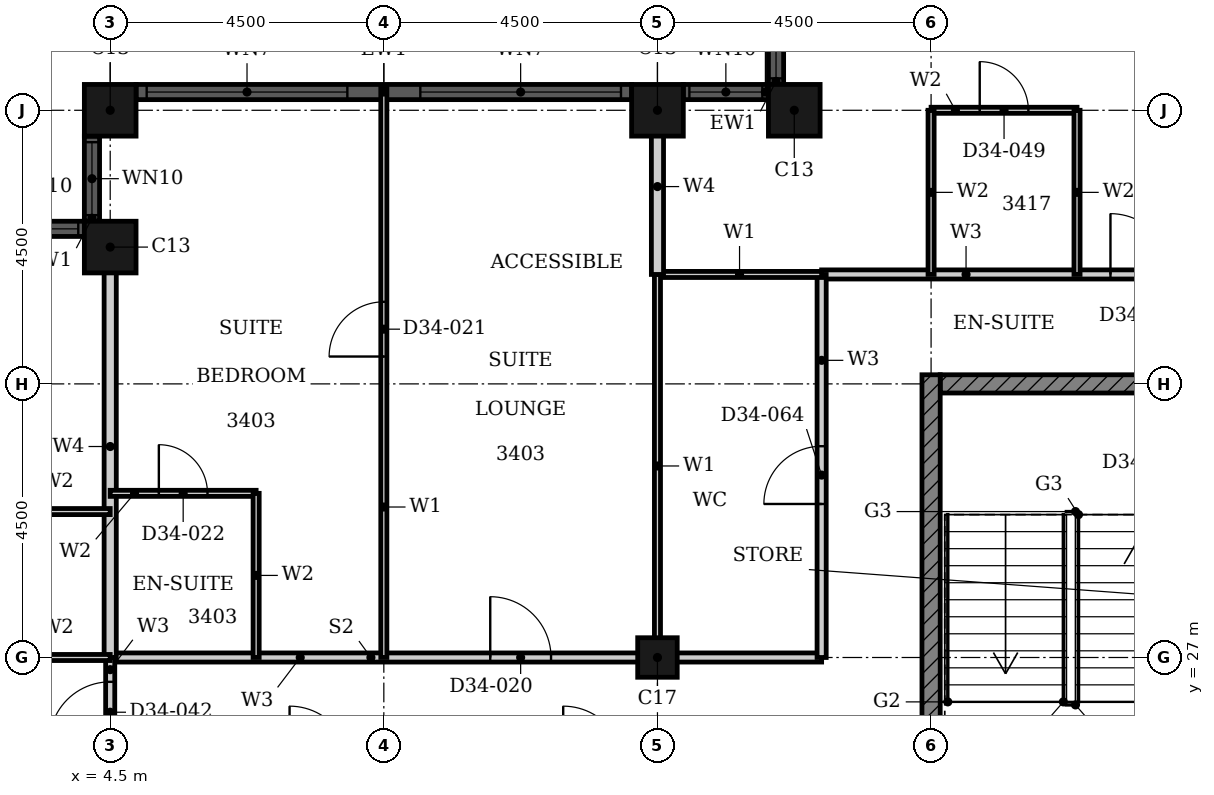
"""IFC4 building model, lengths in metres.
Left out: names, types, materials, properties, quantities, classifications, styles, units other than length and angle.
Written with IfcOpenShell. Run it as: python <this file> out.ifc"""

import sys

from ifc_helpers import new_model, si_unit, direction, frame, frame_2d, origin, origin_2d, place, context, subcontext, project, spatial, rectangle, hollow_rectangle, extrude, element, fill, save


model = new_model("IFC4")
c1 = context("Model", 3, precision=1e-05, world=origin(), true_north=direction((0.0, 1.0)))
c2 = subcontext(c1, "Body", "Model", "MODEL_VIEW")
j1 = project(units=[si_unit("LENGTHUNIT", "METRE"), si_unit("PLANEANGLEUNIT", "RADIAN")], contexts=[c1])
p1 = place(None, origin())
s1 = spatial("IfcSite", under=j1, at=p1, CompositionType="ELEMENT")
p2 = place(p1, origin())
s2 = spatial("IfcBuilding", under=s1, at=p2, CompositionType="ELEMENT")
p3 = place(p2, frame((0.0, 0.0, 136.8)))
s3 = spatial("IfcBuildingStorey", under=s2, at=p3, CompositionType="ELEMENT", Elevation=136.8)
for number, where, z_axis, x_axis in (
    (1, (15.75, 36.0, 0.0), (0.0, 0.0, 1.0), (1.0, 0.0, 0.0)),
    (2, (13.5, 36.0, 0.0), (0.0, 0.0, 1.0), (1.0, 0.0, 0.0)),
    (3, (4.5, 36.0, 0.0), (0.0, 0.0, 1.0), (1.0, 0.0, 0.0)),
    (4, (4.5, 33.75, 0.0), (0.0, 0.0, 1.0), (1.0, 0.0, 0.0)),
):
    element("IfcColumn", number, at=place(p3, frame(where, z_axis=z_axis, x_axis=x_axis)), inside=s3, PredefinedType="COLUMN", context=c2, shape_type="SweptSolid", body=[
        extrude(hollow_rectangle(XDim=0.85, YDim=0.85, WallThickness=0.026, at=origin_2d()), origin(), (0.0, 0.0, 1.0), 3.6),
    ])
p4 = place(p3, frame((13.5, 27.0, 0.0), z_axis=(0.0, 0.0, 1.0), x_axis=(1.0, 0.0, 0.0)))
e5 = element("IfcColumn", 5, at=p4, inside=s3, PredefinedType="COLUMN", context=c2, shape_type="SweptSolid", body=[
    extrude(hollow_rectangle(XDim=0.65, YDim=0.65, WallThickness=0.021, at=origin_2d()), origin(), (0.0, 0.0, 1.0), 3.6),
])
p5 = place(p3, frame((15.45, 37.825, 0.0), z_axis=(0.0, 0.0, 1.0), x_axis=(0.0, -1.0, 0.0)))
e6 = element("IfcWall", 6, at=p5, inside=s3, PredefinedType="SOLIDWALL", context=c2, shape_type="SweptSolid", body=[
    extrude(rectangle(XDim=1.4, YDim=0.25, at=frame_2d((0.7, 0.0))), origin(), (0.0, 0.0, 1.0), 3.6),
])
p6 = place(p5, frame((0.1, 0.0, 0.9)))
e7 = element("IfcOpeningElement", 7, at=p6, cuts=e6, PredefinedType="OPENING", context=c2, shape_type="SweptSolid", body=[
    extrude(rectangle(XDim=1.2, YDim=1.85, at=frame_2d((0.6, 0.925))), frame((0.0, 0.135, 0.0), z_axis=(0.0, -1.0, 0.0), x_axis=(1.0, 0.0, 0.0)), (0.0, 0.0, 1.0), 0.27),
])
p7 = place(p3, frame((15.325, 36.3, 0.0), z_axis=(0.0, 0.0, 1.0), x_axis=(-1.0, 0.0, 0.0)))
e8 = element("IfcWall", 8, at=p7, inside=s3, PredefinedType="SOLIDWALL", context=c2, shape_type="SweptSolid", body=[
    extrude(rectangle(XDim=1.4, YDim=0.25, at=frame_2d((0.7, 0.0))), origin(), (0.0, 0.0, 1.0), 3.6),
])
p8 = place(p7, frame((0.1, 0.0, 0.9)))
e9 = element("IfcOpeningElement", 9, at=p8, cuts=e8, PredefinedType="OPENING", context=c2, shape_type="SweptSolid", body=[
    extrude(rectangle(XDim=1.2, YDim=1.85, at=frame_2d((0.6, 0.925))), frame((0.0, 0.135, 0.0), z_axis=(0.0, -1.0, 0.0), x_axis=(1.0, 0.0, 0.0)), (0.0, 0.0, 1.0), 0.27),
])
p9 = place(p3, frame((13.075, 36.3, 0.0), z_axis=(0.0, 0.0, 1.0), x_axis=(-1.0, 0.0, 0.0)))
e10 = element("IfcWall", 10, at=p9, inside=s3, PredefinedType="SOLIDWALL", context=c2, shape_type="SweptSolid", body=[
    extrude(rectangle(XDim=8.15, YDim=0.25, at=frame_2d((4.075, 0.0))), origin(), (0.0, 0.0, 1.0), 3.6),
])
p10 = place(p9, frame((0.175, 0.0, 0.9)))
e11 = element("IfcOpeningElement", 11, at=p10, cuts=e10, PredefinedType="OPENING", context=c2, shape_type="SweptSolid", body=[
    extrude(rectangle(XDim=3.3, YDim=1.85, at=frame_2d((1.65, 0.925))), frame((0.0, 0.135, 0.0), z_axis=(0.0, -1.0, 0.0), x_axis=(1.0, 0.0, 0.0)), (0.0, 0.0, 1.0), 0.27),
])
p11 = place(p9, frame((4.675, 0.0, 0.9)))
e12 = element("IfcOpeningElement", 12, at=p11, cuts=e10, PredefinedType="OPENING", context=c2, shape_type="SweptSolid", body=[
    extrude(rectangle(XDim=3.3, YDim=1.85, at=frame_2d((1.65, 0.925))), frame((0.0, 0.135, 0.0), z_axis=(0.0, -1.0, 0.0), x_axis=(1.0, 0.0, 0.0)), (0.0, 0.0, 1.0), 0.27),
])
p12 = place(p3, frame((4.2, 35.575, 0.0), z_axis=(0.0, 0.0, 1.0), x_axis=(0.0, -1.0, 0.0)))
e13 = element("IfcWall", 13, at=p12, inside=s3, PredefinedType="SOLIDWALL", context=c2, shape_type="SweptSolid", body=[
    extrude(rectangle(XDim=1.4, YDim=0.25, at=frame_2d((0.7, 0.0))), origin(), (0.0, 0.0, 1.0), 3.6),
])
p13 = place(p12, frame((0.1, 0.0, 0.9)))
e14 = element("IfcOpeningElement", 14, at=p13, cuts=e13, PredefinedType="OPENING", context=c2, shape_type="SweptSolid", body=[
    extrude(rectangle(XDim=1.2, YDim=1.85, at=frame_2d((0.6, 0.925))), frame((0.0, 0.135, 0.0), z_axis=(0.0, -1.0, 0.0), x_axis=(1.0, 0.0, 0.0)), (0.0, 0.0, 1.0), 0.27),
])
p14 = place(p3, frame((4.075, 34.05, 0.0), z_axis=(0.0, 0.0, 1.0), x_axis=(-1.0, 0.0, 0.0)))
e15 = element("IfcWall", 15, at=p14, inside=s3, PredefinedType="SOLIDWALL", context=c2, shape_type="SweptSolid", body=[
    extrude(rectangle(XDim=1.4, YDim=0.25, at=frame_2d((0.7, 0.0))), origin(), (0.0, 0.0, 1.0), 3.6),
])
p15 = place(p14, frame((0.1, 0.0, 0.9)))
e16 = element("IfcOpeningElement", 16, at=p15, cuts=e15, PredefinedType="OPENING", context=c2, shape_type="SweptSolid", body=[
    extrude(rectangle(XDim=1.2, YDim=1.85, at=frame_2d((0.6, 0.925))), frame((0.0, 0.135, 0.0), z_axis=(0.0, -1.0, 0.0), x_axis=(1.0, 0.0, 0.0)), (0.0, 0.0, 1.0), 0.27),
])
p16 = place(p3, frame((18.15, 31.5, 0.0), z_axis=(0.0, 0.0, 1.0), x_axis=(1.0, 0.0, 0.0)))
e17 = element("IfcWall", 17, at=p16, inside=s3, PredefinedType="SHEAR", context=c2, shape_type="SweptSolid", body=[
    extrude(rectangle(XDim=6.797, YDim=0.3, at=frame_2d((3.398, 0.0))), origin(), (0.0, 0.0, 1.0), 3.2),
])
p17 = place(p16, frame((4.736, 0.0, 0.0)))
e18 = element("IfcOpeningElement", 18, at=p17, cuts=e17, PredefinedType="OPENING", context=c2, shape_type="SweptSolid", body=[
    extrude(rectangle(XDim=1.8, YDim=2.1, at=frame_2d((0.9, 1.05))), frame((0.0, 0.16, 0.0), z_axis=(0.0, -1.0, 0.0), x_axis=(1.0, 0.0, 0.0)), (0.0, 0.0, 1.0), 0.32),
])
p18 = place(p3, frame((18.0, 22.35, 0.0), z_axis=(0.0, 0.0, 1.0), x_axis=(0.0, 1.0, 0.0)))
e19 = element("IfcWall", 19, at=p18, inside=s3, PredefinedType="SHEAR", context=c2, shape_type="SweptSolid", body=[
    extrude(rectangle(XDim=9.3, YDim=0.3, at=frame_2d((4.65, 0.0))), origin(), (0.0, 0.0, 1.0), 3.2),
])
p19 = place(p3, frame((4.5, 27.0, 0.0), z_axis=(0.0, 0.0, 1.0), x_axis=(1.0, 0.0, 0.0)))
e20 = element("IfcWall", 20, at=p19, inside=s3, PredefinedType="PARTITIONING", context=c2, shape_type="SweptSolid", body=[
    extrude(rectangle(XDim=11.7, YDim=0.15, at=frame_2d((5.85, 0.0))), origin(), (0.0, 0.0, 1.0), 2.48),
])
p20 = place(p19, frame((6.25, 0.0, 0.0)))
e21 = element("IfcOpeningElement", 21, at=p20, cuts=e20, PredefinedType="OPENING", context=c2, shape_type="SweptSolid", body=[
    extrude(rectangle(XDim=1.0, YDim=2.1, at=frame_2d((0.5, 1.05))), frame((0.0, 0.085, 0.0), z_axis=(0.0, -1.0, 0.0), x_axis=(1.0, 0.0, 0.0)), (0.0, 0.0, 1.0), 0.17),
])
p21 = place(p3, frame((16.2, 33.3, 0.0), z_axis=(0.0, 0.0, 1.0), x_axis=(1.0, 0.0, 0.0)))
e22 = element("IfcWall", 22, at=p21, inside=s3, PredefinedType="PARTITIONING", context=c2, shape_type="SweptSolid", body=[
    extrude(rectangle(XDim=15.3, YDim=0.15, at=frame_2d((7.65, 0.0))), origin(), (0.0, 0.0, 1.0), 3.2),
])
p22 = place(p21, frame((4.75, 0.0, 0.0)))
e23 = element("IfcOpeningElement", 23, at=p22, cuts=e22, PredefinedType="OPENING", context=c2, shape_type="SweptSolid", body=[
    extrude(rectangle(XDim=1.0, YDim=2.1, at=frame_2d((0.5, 1.05))), frame((0.0, 0.085, 0.0), z_axis=(0.0, -1.0, 0.0), x_axis=(1.0, 0.0, 0.0)), (0.0, 0.0, 1.0), 0.17),
])
p23 = place(p21, frame((10.35, 0.0, 0.0)))
e24 = element("IfcOpeningElement", 24, at=p23, cuts=e22, PredefinedType="OPENING", context=c2, shape_type="SweptSolid", body=[
    extrude(rectangle(XDim=0.9, YDim=2.1, at=frame_2d((0.45, 1.05))), frame((0.0, 0.085, 0.0), z_axis=(0.0, -1.0, 0.0), x_axis=(1.0, 0.0, 0.0)), (0.0, 0.0, 1.0), 0.17),
])
p24 = place(p3, frame((16.2, 27.0, 0.0), z_axis=(0.0, 0.0, 1.0), x_axis=(0.0, 1.0, 0.0)))
e25 = element("IfcWall", 25, at=p24, inside=s3, PredefinedType="PARTITIONING", context=c2, shape_type="SweptSolid", body=[
    extrude(rectangle(XDim=6.3, YDim=0.15, at=frame_2d((3.15, 0.0))), origin(), (0.0, 0.0, 1.0), 3.2),
])
p25 = place(p24, frame((2.525, 0.0, 0.0)))
e26 = element("IfcOpeningElement", 26, at=p25, cuts=e25, PredefinedType="OPENING", context=c2, shape_type="SweptSolid", body=[
    extrude(rectangle(XDim=0.95, YDim=2.1, at=frame_2d((0.475, 1.05))), frame((0.0, 0.085, 0.0), z_axis=(0.0, -1.0, 0.0), x_axis=(1.0, 0.0, 0.0)), (0.0, 0.0, 1.0), 0.17),
])
p26 = place(p3, frame((4.5, 25.2, 0.0), z_axis=(0.0, 0.0, 1.0), x_axis=(0.0, 1.0, 0.0)))
e27 = element("IfcWall", 27, at=p26, inside=s3, PredefinedType="PARTITIONING", context=c2, shape_type="SweptSolid", body=[
    extrude(rectangle(XDim=1.8, YDim=0.15, at=frame_2d((0.9, 0.0))), origin(), (0.0, 0.0, 1.0), 3.2),
])
p27 = place(p26, frame((0.4, 0.0, 0.0)))
e28 = element("IfcOpeningElement", 28, at=p27, cuts=e27, PredefinedType="OPENING", context=c2, shape_type="SweptSolid", body=[
    extrude(rectangle(XDim=1.0, YDim=2.1, at=frame_2d((0.5, 1.05))), frame((0.0, 0.085, 0.0), z_axis=(0.0, -1.0, 0.0), x_axis=(1.0, 0.0, 0.0)), (0.0, 0.0, 1.0), 0.17),
])
p28 = place(p3, frame((13.5, 33.3, 0.0), z_axis=(0.0, 0.0, 1.0), x_axis=(1.0, 0.0, 0.0)))
e29 = element("IfcWall", 29, at=p28, inside=s3, PredefinedType="PARTITIONING", context=c2, shape_type="SweptSolid", body=[
    extrude(rectangle(XDim=2.7, YDim=0.1, at=frame_2d((1.35, 0.0))), origin(), (0.0, 0.0, 1.0), 3.2),
])
p29 = place(p3, frame((13.5, 27.0, 0.0), z_axis=(0.0, 0.0, 1.0), x_axis=(0.0, 1.0, 0.0)))
e30 = element("IfcWall", 30, at=p29, inside=s3, PredefinedType="PARTITIONING", context=c2, shape_type="SweptSolid", body=[
    extrude(rectangle(XDim=6.3, YDim=0.1, at=frame_2d((3.15, 0.0))), origin(), (0.0, 0.0, 1.0), 2.28),
])
p30 = place(p3, frame((9.0, 27.0, 0.0), z_axis=(0.0, 0.0, 1.0), x_axis=(0.0, 1.0, 0.0)))
e31 = element("IfcWall", 31, at=p30, inside=s3, PredefinedType="PARTITIONING", context=c2, shape_type="SweptSolid", body=[
    extrude(rectangle(XDim=9.365, YDim=0.1, at=frame_2d((4.683, 0.0))), origin(), (0.0, 0.0, 1.0), 3.2),
])
p31 = place(p30, frame((4.95, 0.0, 0.0)))
e32 = element("IfcOpeningElement", 32, at=p31, cuts=e31, PredefinedType="OPENING", context=c2, shape_type="SweptSolid", body=[
    extrude(rectangle(XDim=0.9, YDim=2.1, at=frame_2d((0.45, 1.05))), frame((0.0, 0.06, 0.0), z_axis=(0.0, -1.0, 0.0), x_axis=(1.0, 0.0, 0.0)), (0.0, 0.0, 1.0), 0.12),
])
p32 = place(p3, frame((13.5, 33.3, 0.0), z_axis=(0.0, 0.0, 1.0), x_axis=(0.0, 1.0, 0.0)))
e33 = element("IfcWall", 33, at=p32, inside=s3, PredefinedType="PARTITIONING", context=c2, shape_type="SweptSolid", body=[
    extrude(rectangle(XDim=2.89, YDim=0.2, at=frame_2d((1.445, 0.0))), origin(), (0.0, 0.0, 1.0), 2.28),
])
p33 = place(p3, frame((4.5, 27.0, 0.0), z_axis=(0.0, 0.0, 1.0), x_axis=(0.0, 1.0, 0.0)))
e34 = element("IfcWall", 34, at=p33, inside=s3, PredefinedType="PARTITIONING", context=c2, shape_type="SweptSolid", body=[
    extrude(rectangle(XDim=6.94, YDim=0.2, at=frame_2d((3.47, 0.0))), origin(), (0.0, 0.0, 1.0), 3.2),
])
p34 = place(p3, frame((1.8, 27.0, 0.0), z_axis=(0.0, 0.0, 1.0), x_axis=(1.0, 0.0, 0.0)))
e35 = element("IfcWall", 35, at=p34, inside=s3, PredefinedType="PARTITIONING", context=c2, shape_type="SweptSolid", body=[
    extrude(rectangle(XDim=2.7, YDim=0.1, at=frame_2d((1.35, 0.0))), origin(), (0.0, 0.0, 1.0), 2.48),
])
p35 = place(p3, frame((1.8, 29.4, 0.0), z_axis=(0.0, 0.0, 1.0), x_axis=(1.0, 0.0, 0.0)))
e36 = element("IfcWall", 36, at=p35, inside=s3, PredefinedType="PARTITIONING", context=c2, shape_type="SweptSolid", body=[
    extrude(rectangle(XDim=2.7, YDim=0.1, at=frame_2d((1.35, 0.0))), origin(), (0.0, 0.0, 1.0), 3.2),
])
p36 = place(p3, frame((4.5, 29.7, 0.0), z_axis=(0.0, 0.0, 1.0), x_axis=(1.0, 0.0, 0.0)))
e37 = element("IfcWall", 37, at=p36, inside=s3, PredefinedType="PARTITIONING", context=c2, shape_type="SweptSolid", body=[
    extrude(rectangle(XDim=2.4, YDim=0.1, at=frame_2d((1.2, 0.0))), origin(), (0.0, 0.0, 1.0), 3.2),
])
p37 = place(p36, frame((0.8, 0.0, 0.0)))
e38 = element("IfcOpeningElement", 38, at=p37, cuts=e37, PredefinedType="OPENING", context=c2, shape_type="SweptSolid", body=[
    extrude(rectangle(XDim=0.8, YDim=2.1, at=frame_2d((0.4, 1.05))), frame((0.0, 0.06, 0.0), z_axis=(0.0, -1.0, 0.0), x_axis=(1.0, 0.0, 0.0)), (0.0, 0.0, 1.0), 0.12),
])
p38 = place(p3, frame((18.0, 36.0, 0.0), z_axis=(0.0, 0.0, 1.0), x_axis=(1.0, 0.0, 0.0)))
e39 = element("IfcWall", 39, at=p38, inside=s3, PredefinedType="PARTITIONING", context=c2, shape_type="SweptSolid", body=[
    extrude(rectangle(XDim=2.4, YDim=0.1, at=frame_2d((1.2, 0.0))), origin(), (0.0, 0.0, 1.0), 3.2),
])
p39 = place(p38, frame((0.8, 0.0, 0.0)))
e40 = element("IfcOpeningElement", 40, at=p39, cuts=e39, PredefinedType="OPENING", context=c2, shape_type="SweptSolid", body=[
    extrude(rectangle(XDim=0.8, YDim=2.1, at=frame_2d((0.4, 1.05))), frame((0.0, 0.06, 0.0), z_axis=(0.0, -1.0, 0.0), x_axis=(1.0, 0.0, 0.0)), (0.0, 0.0, 1.0), 0.12),
])
for number, where, z_axis, x_axis in (
    (41, (18.0, 33.3, 0.0), (0.0, 0.0, 1.0), (0.0, 1.0, 0.0)),
    (42, (20.4, 33.3, 0.0), (0.0, 0.0, 1.0), (0.0, 1.0, 0.0)),
    (43, (6.9, 27.0, 0.0), (0.0, 0.0, 1.0), (0.0, 1.0, 0.0)),
):
    element("IfcWall", number, at=place(p3, frame(where, z_axis=z_axis, x_axis=x_axis)), inside=s3, PredefinedType="PARTITIONING", context=c2, shape_type="SweptSolid", body=[
        extrude(rectangle(XDim=2.7, YDim=0.1, at=frame_2d((1.35, 0.0))), origin(), (0.0, 0.0, 1.0), 3.2),
    ])
p40 = place(p6, origin())
e44 = element("IfcWindow", 44, at=p40, inside=s3, PartitioningType="SINGLE_PANEL", PredefinedType="WINDOW", context=c2, shape_type="SweptSolid", body=[
    extrude(rectangle(XDim=1.2, YDim=1.85, at=frame_2d((0.6, 0.925))), frame((0.0, 0.03, 0.0), z_axis=(0.0, -1.0, 0.0), x_axis=(1.0, 0.0, 0.0)), (0.0, 0.0, 1.0), 0.06),
])
fill(e7, e44)
p41 = place(p8, origin())
e45 = element("IfcWindow", 45, at=p41, inside=s3, PartitioningType="SINGLE_PANEL", PredefinedType="WINDOW", context=c2, shape_type="SweptSolid", body=[
    extrude(rectangle(XDim=1.2, YDim=1.85, at=frame_2d((0.6, 0.925))), frame((0.0, 0.03, 0.0), z_axis=(0.0, -1.0, 0.0), x_axis=(1.0, 0.0, 0.0)), (0.0, 0.0, 1.0), 0.06),
])
fill(e9, e45)
p42 = place(p10, origin())
e46 = element("IfcWindow", 46, at=p42, inside=s3, PartitioningType="SINGLE_PANEL", PredefinedType="WINDOW", context=c2, shape_type="SweptSolid", body=[
    extrude(rectangle(XDim=3.3, YDim=1.85, at=frame_2d((1.65, 0.925))), frame((0.0, 0.03, 0.0), z_axis=(0.0, -1.0, 0.0), x_axis=(1.0, 0.0, 0.0)), (0.0, 0.0, 1.0), 0.06),
])
fill(e11, e46)
p43 = place(p11, origin())
e47 = element("IfcWindow", 47, at=p43, inside=s3, PartitioningType="SINGLE_PANEL", PredefinedType="WINDOW", context=c2, shape_type="SweptSolid", body=[
    extrude(rectangle(XDim=3.3, YDim=1.85, at=frame_2d((1.65, 0.925))), frame((0.0, 0.03, 0.0), z_axis=(0.0, -1.0, 0.0), x_axis=(1.0, 0.0, 0.0)), (0.0, 0.0, 1.0), 0.06),
])
fill(e12, e47)
p44 = place(p13, origin())
e48 = element("IfcWindow", 48, at=p44, inside=s3, PartitioningType="SINGLE_PANEL", PredefinedType="WINDOW", context=c2, shape_type="SweptSolid", body=[
    extrude(rectangle(XDim=1.2, YDim=1.85, at=frame_2d((0.6, 0.925))), frame((0.0, 0.03, 0.0), z_axis=(0.0, -1.0, 0.0), x_axis=(1.0, 0.0, 0.0)), (0.0, 0.0, 1.0), 0.06),
])
fill(e14, e48)
p45 = place(p15, origin())
e49 = element("IfcWindow", 49, at=p45, inside=s3, PartitioningType="SINGLE_PANEL", PredefinedType="WINDOW", context=c2, shape_type="SweptSolid", body=[
    extrude(rectangle(XDim=1.2, YDim=1.85, at=frame_2d((0.6, 0.925))), frame((0.0, 0.03, 0.0), z_axis=(0.0, -1.0, 0.0), x_axis=(1.0, 0.0, 0.0)), (0.0, 0.0, 1.0), 0.06),
])
fill(e16, e49)
p46 = place(p20, origin())
e50 = element("IfcDoor", 50, at=p46, inside=s3, OperationType="SINGLE_SWING_RIGHT", PredefinedType="DOOR", context=c2, shape_type="SweptSolid", body=[
    extrude(rectangle(XDim=1.0, YDim=2.1, at=frame_2d((0.5, 1.05))), frame((0.0, 0.025, 0.0), z_axis=(0.0, -1.0, 0.0), x_axis=(1.0, 0.0, 0.0)), (0.0, 0.0, 1.0), 0.05),
])
fill(e21, e50)
p47 = place(p31, origin())
e51 = element("IfcDoor", 51, at=p47, inside=s3, OperationType="SINGLE_SWING_RIGHT", PredefinedType="DOOR", context=c2, shape_type="SweptSolid", body=[
    extrude(rectangle(XDim=0.9, YDim=2.1, at=frame_2d((0.45, 1.05))), frame((0.0, 0.025, 0.0), z_axis=(0.0, -1.0, 0.0), x_axis=(1.0, 0.0, 0.0)), (0.0, 0.0, 1.0), 0.05),
])
fill(e32, e51)
p48 = place(p37, origin())
e52 = element("IfcDoor", 52, at=p48, inside=s3, OperationType="SINGLE_SWING_RIGHT", PredefinedType="DOOR", context=c2, shape_type="SweptSolid", body=[
    extrude(rectangle(XDim=0.8, YDim=2.1, at=frame_2d((0.4, 1.05))), frame((0.0, 0.025, 0.0), z_axis=(0.0, -1.0, 0.0), x_axis=(1.0, 0.0, 0.0)), (0.0, 0.0, 1.0), 0.05),
])
fill(e38, e52)
p49 = place(p27, origin())
e53 = element("IfcDoor", 53, at=p49, inside=s3, OperationType="SINGLE_SWING_RIGHT", PredefinedType="DOOR", context=c2, shape_type="SweptSolid", body=[
    extrude(rectangle(XDim=1.0, YDim=2.1, at=frame_2d((0.5, 1.05))), frame((0.0, 0.025, 0.0), z_axis=(0.0, -1.0, 0.0), x_axis=(1.0, 0.0, 0.0)), (0.0, 0.0, 1.0), 0.05),
])
fill(e28, e53)
p50 = place(p22, origin())
e54 = element("IfcDoor", 54, at=p50, inside=s3, OperationType="SINGLE_SWING_RIGHT", PredefinedType="DOOR", context=c2, shape_type="SweptSolid", body=[
    extrude(rectangle(XDim=1.0, YDim=2.1, at=frame_2d((0.5, 1.05))), frame((0.0, 0.025, 0.0), z_axis=(0.0, -1.0, 0.0), x_axis=(1.0, 0.0, 0.0)), (0.0, 0.0, 1.0), 0.05),
])
fill(e23, e54)
p51 = place(p39, origin())
e55 = element("IfcDoor", 55, at=p51, inside=s3, OperationType="SINGLE_SWING_LEFT", PredefinedType="DOOR", context=c2, shape_type="SweptSolid", body=[
    extrude(rectangle(XDim=0.8, YDim=2.1, at=frame_2d((0.4, 1.05))), frame((0.0, 0.025, 0.0), z_axis=(0.0, -1.0, 0.0), x_axis=(1.0, 0.0, 0.0)), (0.0, 0.0, 1.0), 0.05),
])
fill(e40, e55)
p52 = place(p25, origin())
e56 = element("IfcDoor", 56, at=p52, inside=s3, OperationType="SINGLE_SWING_LEFT", PredefinedType="DOOR", context=c2, shape_type="SweptSolid", body=[
    extrude(rectangle(XDim=0.95, YDim=2.1, at=frame_2d((0.475, 1.05))), frame((0.0, 0.025, 0.0), z_axis=(0.0, -1.0, 0.0), x_axis=(1.0, 0.0, 0.0)), (0.0, 0.0, 1.0), 0.05),
])
fill(e26, e56)
save(model, sys.argv[1])
